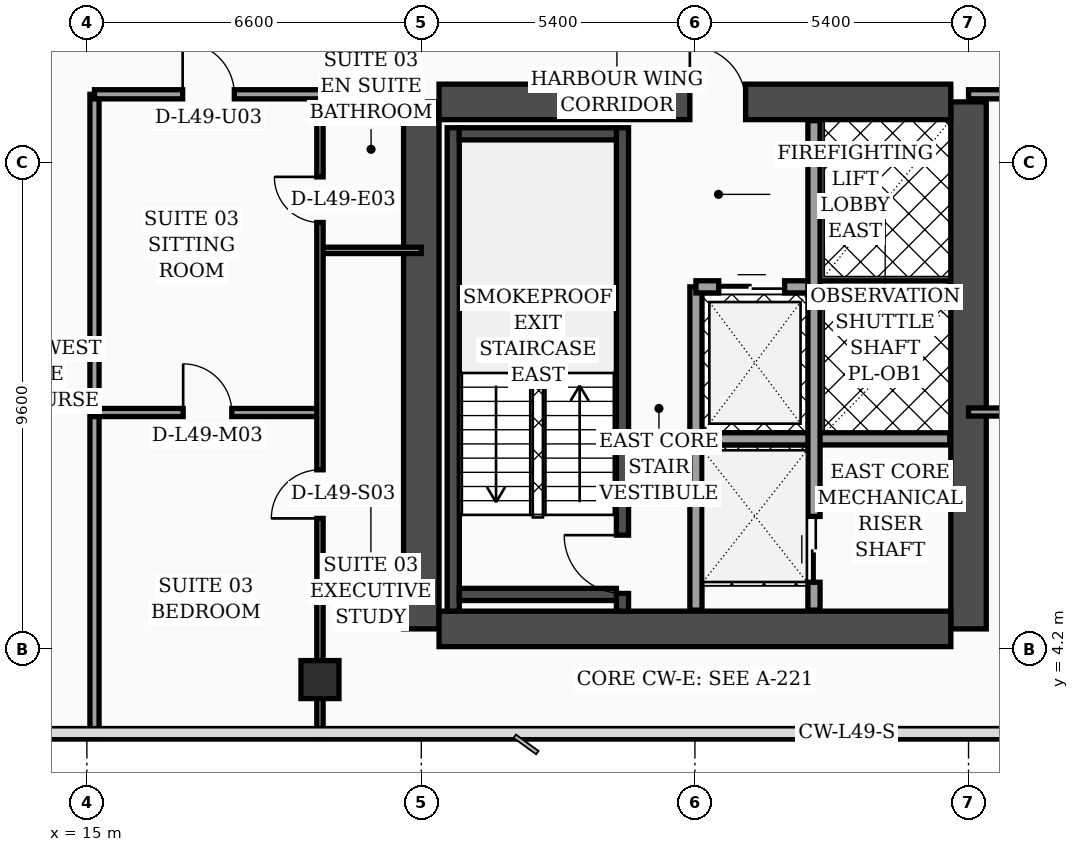
"""IFC4 building model, lengths in metres.
Left out: names, types, materials, properties, quantities, classifications, styles, units other than length and angle.
Written with IfcOpenShell. Run it as: python <this file> out.ifc"""

import sys

from ifc_helpers import new_model, si_unit, direction, frame, frame_2d, origin, origin_2d, place, context, subcontext, project, spatial, rectangle, hollow_rectangle, extrude, element, fill, save


model = new_model("IFC4")
c1 = context("Model", 3, precision=1e-05, world=origin(), true_north=direction((0.0, 1.0)))
c2 = subcontext(c1, "Body", "Model", "MODEL_VIEW")
j1 = project(units=[si_unit("LENGTHUNIT", "METRE"), si_unit("PLANEANGLEUNIT", "RADIAN")], contexts=[c1])
p1 = place(None, origin())
s1 = spatial("IfcSite", under=j1, at=p1, CompositionType="ELEMENT")
p2 = place(p1, origin())
s2 = spatial("IfcBuilding", under=s1, at=p2, CompositionType="ELEMENT")
p3 = place(p2, frame((0.0, 0.0, 199.6)))
s3 = spatial("IfcBuildingStorey", under=s2, at=p3, CompositionType="ELEMENT", Elevation=199.6)
for number, where, z_axis, x_axis in (
    (1, (21.6, 4.6, 0.0), (0.0, 0.0, 1.0), (0.0, 1.0, 0.0)),
    (2, (32.4, 4.6, 0.0), (0.0, 0.0, 1.0), (0.0, 1.0, 0.0)),
):
    element("IfcWall", number, at=place(p3, frame(where, z_axis=z_axis, x_axis=x_axis)), inside=s3, PredefinedType="SHEAR", context=c2, shape_type="SweptSolid", body=[
        extrude(rectangle(XDim=10.4, YDim=0.7, at=frame_2d((5.2, 0.0))), origin(), (0.0, 0.0, 1.0), 3.56),
    ])
p4 = place(p3, frame((21.95, 15.0, 0.0), z_axis=(0.0, 0.0, 1.0), x_axis=(1.0, 0.0, 0.0)))
e3 = element("IfcWall", 3, at=p4, inside=s3, PredefinedType="SHEAR", context=c2, shape_type="SweptSolid", body=[
    extrude(rectangle(XDim=10.1, YDim=0.7, at=frame_2d((5.05, 0.0))), origin(), (0.0, 0.0, 1.0), 3.56),
])
p5 = place(p4, frame((4.95, 0.0, 0.0)))
e4 = element("IfcOpeningElement", 4, at=p5, cuts=e3, PredefinedType="OPENING", context=c2, shape_type="SweptSolid", body=[
    extrude(rectangle(XDim=1.1, YDim=2.2, at=frame_2d((0.55, 1.1))), frame((0.0, 0.36, 0.0), z_axis=(0.0, -1.0, 0.0), x_axis=(1.0, 0.0, 0.0)), (0.0, 0.0, 1.0), 0.72),
])
p6 = place(p3, frame((21.95, 4.6, 0.0), z_axis=(0.0, 0.0, 1.0), x_axis=(1.0, 0.0, 0.0)))
e5 = element("IfcWall", 5, at=p6, inside=s3, PredefinedType="SHEAR", context=c2, shape_type="SweptSolid", body=[
    extrude(rectangle(XDim=10.1, YDim=0.7, at=frame_2d((5.05, 0.0))), origin(), (0.0, 0.0, 1.0), 3.56),
])
p7 = place(p3, frame((22.23, 4.95, 0.0), z_axis=(0.0, 0.0, 1.0), x_axis=(0.0, 1.0, 0.0)))
e6 = element("IfcWall", 6, at=p7, inside=s3, PredefinedType="SOLIDWALL", context=c2, shape_type="SweptSolid", body=[
    extrude(rectangle(XDim=9.54, YDim=0.24, at=frame_2d((4.77, 0.0))), origin(), (0.0, 0.0, 1.0), 3.56),
])
p8 = place(p3, frame((25.57, 4.95, 0.0), z_axis=(0.0, 0.0, 1.0), x_axis=(0.0, 1.0, 0.0)))
e7 = element("IfcWall", 7, at=p8, inside=s3, PredefinedType="SOLIDWALL", context=c2, shape_type="SweptSolid", body=[
    extrude(rectangle(XDim=9.54, YDim=0.24, at=frame_2d((4.77, 0.0))), origin(), (0.0, 0.0, 1.0), 3.56),
])
p9 = place(p8, frame((0.35, 0.0, 0.0)))
e8 = element("IfcOpeningElement", 8, at=p9, cuts=e7, PredefinedType="OPENING", context=c2, shape_type="SweptSolid", body=[
    extrude(rectangle(XDim=1.15, YDim=2.2, at=frame_2d((0.575, 1.1))), frame((0.0, 0.13, 0.0), z_axis=(0.0, -1.0, 0.0), x_axis=(1.0, 0.0, 0.0)), (0.0, 0.0, 1.0), 0.26),
])
for number, where, z_axis, x_axis in (
    (9, (22.35, 5.28, 0.0), (0.0, 0.0, 1.0), (1.0, 0.0, 0.0)),
    (10, (22.35, 14.37, 0.0), (0.0, 0.0, 1.0), (1.0, 0.0, 0.0)),
):
    element("IfcWall", number, at=place(p3, frame(where, z_axis=z_axis, x_axis=x_axis)), inside=s3, PredefinedType="SOLIDWALL", context=c2, shape_type="SweptSolid", body=[
        extrude(rectangle(XDim=3.1, YDim=0.24, at=frame_2d((1.55, 0.0))), origin(), (0.0, 0.0, 1.0), 3.56),
    ])
p10 = place(p3, frame((19.6, 3.6, 0.0), z_axis=(0.0, 0.0, 1.0), x_axis=(1.0, 0.0, 0.0)))
e11 = element("IfcColumn", 11, at=p10, inside=s3, PredefinedType="COLUMN", context=c2, shape_type="SweptSolid", body=[
    extrude(hollow_rectangle(XDim=0.75, YDim=0.75, WallThickness=0.032, at=origin_2d()), origin(), (0.0, 0.0, 1.0), 3.56),
])
p11 = place(p3, frame((27.02, 4.97, 0.0), z_axis=(0.0, 0.0, 1.0), x_axis=(0.0, 1.0, 0.0)))
e12 = element("IfcWall", 12, at=p11, inside=s3, PredefinedType="SOLIDWALL", context=c2, shape_type="SweptSolid", body=[
    extrude(rectangle(XDim=6.38, YDim=0.24, at=frame_2d((3.19, 0.0))), origin(), (0.0, 0.0, 1.0), 3.56),
])
p12 = place(p3, frame((27.02, 11.35, 0.0), z_axis=(0.0, 0.0, 1.0), x_axis=(1.0, 0.0, 0.0)))
e13 = element("IfcWall", 13, at=p12, inside=s3, PredefinedType="SOLIDWALL", context=c2, shape_type="SweptSolid", body=[
    extrude(rectangle(XDim=5.01, YDim=0.24, at=frame_2d((2.505, 0.0))), origin(), (0.0, 0.0, 1.0), 3.56),
])
p13 = place(p12, frame((0.45, 0.0, 0.0)))
e14 = element("IfcOpeningElement", 14, at=p13, cuts=e13, PredefinedType="OPENING", context=c2, shape_type="SweptSolid", body=[
    extrude(rectangle(XDim=1.3, YDim=2.35, at=frame_2d((0.65, 1.175))), frame((0.0, 0.13, 0.0), z_axis=(0.0, -1.0, 0.0), x_axis=(1.0, 0.0, 0.0)), (0.0, 0.0, 1.0), 0.26),
])
p14 = place(p3, frame((27.02, 8.35, 0.0), z_axis=(0.0, 0.0, 1.0), x_axis=(1.0, 0.0, 0.0)))
e15 = element("IfcWall", 15, at=p14, inside=s3, PredefinedType="SOLIDWALL", context=c2, shape_type="SweptSolid", body=[
    extrude(rectangle(XDim=5.01, YDim=0.24, at=frame_2d((2.505, 0.0))), origin(), (0.0, 0.0, 1.0), 3.56),
])
p15 = place(p3, frame((29.35, 4.97, 0.0), z_axis=(0.0, 0.0, 1.0), x_axis=(0.0, 1.0, 0.0)))
e16 = element("IfcWall", 16, at=p15, inside=s3, PredefinedType="SOLIDWALL", context=c2, shape_type="SweptSolid", body=[
    extrude(rectangle(XDim=9.66, YDim=0.24, at=frame_2d((4.83, 0.0))), origin(), (0.0, 0.0, 1.0), 3.56),
])
p16 = place(p15, frame((0.55, 0.0, 0.0)))
e17 = element("IfcOpeningElement", 17, at=p16, cuts=e16, PredefinedType="OPENING", context=c2, shape_type="SweptSolid", body=[
    extrude(rectangle(XDim=1.3, YDim=2.35, at=frame_2d((0.65, 1.175))), frame((0.0, 0.13, 0.0), z_axis=(0.0, -1.0, 0.0), x_axis=(1.0, 0.0, 0.0)), (0.0, 0.0, 1.0), 0.26),
])
p17 = place(p3, frame((15.15, 2.44, 0.0), z_axis=(0.0, 0.0, 1.0), x_axis=(0.0, 1.0, 0.0)))
e18 = element("IfcWall", 18, at=p17, inside=s3, PredefinedType="PARTITIONING", context=c2, shape_type="SweptSolid", body=[
    extrude(rectangle(XDim=12.71, YDim=0.18, at=frame_2d((6.355, 0.0))), origin(), (0.0, 0.0, 1.0), 3.09),
])
p18 = place(p3, frame((19.6, 12.07, 0.0), z_axis=(0.0, 0.0, 1.0), x_axis=(1.0, 0.0, 0.0)))
e19 = element("IfcWall", 19, at=p18, inside=s3, PredefinedType="PARTITIONING", context=c2, shape_type="SweptSolid", body=[
    extrude(rectangle(XDim=2.0, YDim=0.125, at=frame_2d((1.0, 0.0))), origin(), (0.0, 0.0, 1.0), 3.56),
])
p19 = place(p3, frame((15.15, 8.87, 0.0), z_axis=(0.0, 0.0, 1.0), x_axis=(1.0, 0.0, 0.0)))
e20 = element("IfcWall", 20, at=p19, inside=s3, PredefinedType="PARTITIONING", context=c2, shape_type="SweptSolid", body=[
    extrude(rectangle(XDim=4.45, YDim=0.16, at=frame_2d((2.225, 0.0))), origin(), (0.0, 0.0, 1.0), 3.56),
])
p20 = place(p19, frame((1.75, 0.0, 0.0)))
e21 = element("IfcOpeningElement", 21, at=p20, cuts=e20, PredefinedType="OPENING", context=c2, shape_type="SweptSolid", body=[
    extrude(rectangle(XDim=0.96, YDim=2.2, at=frame_2d((0.48, 1.1))), frame((0.0, 0.09, 0.0), z_axis=(0.0, -1.0, 0.0), x_axis=(1.0, 0.0, 0.0)), (0.0, 0.0, 1.0), 0.18),
])
p21 = place(p3, frame((19.6, 2.44, 0.0), z_axis=(0.0, 0.0, 1.0), x_axis=(0.0, 1.0, 0.0)))
e22 = element("IfcWall", 22, at=p21, inside=s3, PredefinedType="PARTITIONING", context=c2, shape_type="SweptSolid", body=[
    extrude(rectangle(XDim=12.71, YDim=0.125, at=frame_2d((6.355, 0.0))), origin(), (0.0, 0.0, 1.0), 2.59),
])
p22 = place(p21, frame((4.34, 0.0, 0.0)))
e23 = element("IfcOpeningElement", 23, at=p22, cuts=e22, PredefinedType="OPENING", context=c2, shape_type="SweptSolid", body=[
    extrude(rectangle(XDim=0.96, YDim=2.2, at=frame_2d((0.48, 1.1))), frame((0.0, 0.073, 0.0), z_axis=(0.0, -1.0, 0.0), x_axis=(1.0, 0.0, 0.0)), (0.0, 0.0, 1.0), 0.145),
])
p23 = place(p21, frame((10.18, 0.0, 0.0)))
e24 = element("IfcOpeningElement", 24, at=p23, cuts=e22, PredefinedType="OPENING", context=c2, shape_type="SweptSolid", body=[
    extrude(rectangle(XDim=0.9, YDim=2.15, at=frame_2d((0.45, 1.075))), frame((0.0, 0.073, 0.0), z_axis=(0.0, -1.0, 0.0), x_axis=(1.0, 0.0, 0.0)), (0.0, 0.0, 1.0), 0.145),
])
p24 = place(p3, frame((15.15, 15.15, 0.0), z_axis=(0.0, 0.0, 1.0), x_axis=(1.0, 0.0, 0.0)))
e25 = element("IfcWall", 25, at=p24, inside=s3, PredefinedType="PARTITIONING", context=c2, shape_type="SweptSolid", body=[
    extrude(rectangle(XDim=6.45, YDim=0.18, at=frame_2d((3.225, 0.0))), origin(), (0.0, 0.0, 1.0), 2.59),
])
p25 = place(p24, frame((1.74, 0.0, 0.0)))
e26 = element("IfcOpeningElement", 26, at=p25, cuts=e25, PredefinedType="OPENING", context=c2, shape_type="SweptSolid", body=[
    extrude(rectangle(XDim=1.02, YDim=2.2, at=frame_2d((0.51, 1.1))), frame((0.0, 0.1, 0.0), z_axis=(0.0, -1.0, 0.0), x_axis=(1.0, 0.0, 0.0)), (0.0, 0.0, 1.0), 0.2),
])
p26 = place(p3, frame((32.4, 8.88, 0.0), z_axis=(0.0, 0.0, 1.0), x_axis=(1.0, 0.0, 0.0)))
e27 = element("IfcWall", 27, at=p26, inside=s3, PredefinedType="PARTITIONING", context=c2, shape_type="SweptSolid", body=[
    extrude(rectangle(XDim=7.02, YDim=0.16, at=frame_2d((3.51, 0.0))), origin(), (0.0, 0.0, 1.0), 2.94),
])
p27 = place(p26, frame((3.03, 0.0, 0.0)))
e28 = element("IfcOpeningElement", 28, at=p27, cuts=e27, PredefinedType="OPENING", context=c2, shape_type="SweptSolid", body=[
    extrude(rectangle(XDim=0.96, YDim=2.2, at=frame_2d((0.48, 1.1))), frame((0.0, 0.09, 0.0), z_axis=(0.0, -1.0, 0.0), x_axis=(1.0, 0.0, 0.0)), (0.0, 0.0, 1.0), 0.18),
])
p28 = place(p3, frame((32.4, 15.15, 0.0), z_axis=(0.0, 0.0, 1.0), x_axis=(1.0, 0.0, 0.0)))
e29 = element("IfcWall", 29, at=p28, inside=s3, PredefinedType="PARTITIONING", context=c2, shape_type="SweptSolid", body=[
    extrude(rectangle(XDim=9.15, YDim=0.18, at=frame_2d((4.575, 0.0))), origin(), (0.0, 0.0, 1.0), 2.94),
])
p29 = place(p28, frame((3.1, 0.0, 0.0)))
e30 = element("IfcOpeningElement", 30, at=p29, cuts=e29, PredefinedType="OPENING", context=c2, shape_type="SweptSolid", body=[
    extrude(rectangle(XDim=1.02, YDim=2.2, at=frame_2d((0.51, 1.1))), frame((0.0, 0.1, 0.0), z_axis=(0.0, -1.0, 0.0), x_axis=(1.0, 0.0, 0.0)), (0.0, 0.0, 1.0), 0.2),
])
p30 = place(p13, origin())
e31 = element("IfcDoor", 31, at=p30, inside=s3, OperationType="DOUBLE_DOOR_SLIDING", PredefinedType="DOOR", context=c2, shape_type="SweptSolid", body=[
    extrude(rectangle(XDim=1.3, YDim=2.35, at=frame_2d((0.65, 1.175))), frame((0.0, 0.025, 0.0), z_axis=(0.0, -1.0, 0.0), x_axis=(1.0, 0.0, 0.0)), (0.0, 0.0, 1.0), 0.05),
])
fill(e14, e31)
p31 = place(p16, origin())
e32 = element("IfcDoor", 32, at=p31, inside=s3, OperationType="DOUBLE_DOOR_SLIDING", PredefinedType="DOOR", context=c2, shape_type="SweptSolid", body=[
    extrude(rectangle(XDim=1.3, YDim=2.35, at=frame_2d((0.65, 1.175))), frame((0.0, 0.025, 0.0), z_axis=(0.0, -1.0, 0.0), x_axis=(1.0, 0.0, 0.0)), (0.0, 0.0, 1.0), 0.05),
])
fill(e17, e32)
p32 = place(p20, origin())
e33 = element("IfcDoor", 33, at=p32, inside=s3, OperationType="SINGLE_SWING_LEFT", PredefinedType="DOOR", context=c2, shape_type="SweptSolid", body=[
    extrude(rectangle(XDim=0.96, YDim=2.2, at=frame_2d((0.48, 1.1))), frame((0.0, 0.025, 0.0), z_axis=(0.0, -1.0, 0.0), x_axis=(1.0, 0.0, 0.0)), (0.0, 0.0, 1.0), 0.05),
])
fill(e21, e33)
p33 = place(p22, origin())
e34 = element("IfcDoor", 34, at=p33, inside=s3, OperationType="SINGLE_SWING_LEFT", PredefinedType="DOOR", context=c2, shape_type="SweptSolid", body=[
    extrude(rectangle(XDim=0.96, YDim=2.2, at=frame_2d((0.48, 1.1))), frame((0.0, 0.025, 0.0), z_axis=(0.0, -1.0, 0.0), x_axis=(1.0, 0.0, 0.0)), (0.0, 0.0, 1.0), 0.05),
])
fill(e23, e34)
p34 = place(p23, origin())
e35 = element("IfcDoor", 35, at=p34, inside=s3, OperationType="SINGLE_SWING_RIGHT", PredefinedType="DOOR", context=c2, shape_type="SweptSolid", body=[
    extrude(rectangle(XDim=0.9, YDim=2.15, at=frame_2d((0.45, 1.075))), frame((0.0, 0.025, 0.0), z_axis=(0.0, -1.0, 0.0), x_axis=(1.0, 0.0, 0.0)), (0.0, 0.0, 1.0), 0.05),
])
fill(e24, e35)
p35 = place(p25, origin())
e36 = element("IfcDoor", 36, at=p35, inside=s3, OperationType="SINGLE_SWING_LEFT", PredefinedType="DOOR", context=c2, shape_type="SweptSolid", body=[
    extrude(rectangle(XDim=1.02, YDim=2.2, at=frame_2d((0.51, 1.1))), frame((0.0, 0.025, 0.0), z_axis=(0.0, -1.0, 0.0), x_axis=(1.0, 0.0, 0.0)), (0.0, 0.0, 1.0), 0.05),
])
fill(e26, e36)
p36 = place(p9, origin())
e37 = element("IfcDoor", 37, at=p36, inside=s3, OperationType="SINGLE_SWING_RIGHT", PredefinedType="DOOR", context=c2, shape_type="SweptSolid", body=[
    extrude(rectangle(XDim=1.15, YDim=2.2, at=frame_2d((0.575, 1.1))), frame((0.0, 0.025, 0.0), z_axis=(0.0, -1.0, 0.0), x_axis=(1.0, 0.0, 0.0)), (0.0, 0.0, 1.0), 0.05),
])
fill(e8, e37)
p37 = place(p5, origin())
e38 = element("IfcDoor", 38, at=p37, inside=s3, OperationType="SINGLE_SWING_LEFT", PredefinedType="DOOR", context=c2, shape_type="SweptSolid", body=[
    extrude(rectangle(XDim=1.1, YDim=2.2, at=frame_2d((0.55, 1.1))), frame((0.0, 0.025, 0.0), z_axis=(0.0, -1.0, 0.0), x_axis=(1.0, 0.0, 0.0)), (0.0, 0.0, 1.0), 0.05),
])
fill(e4, e38)
save(model, sys.argv[1])
